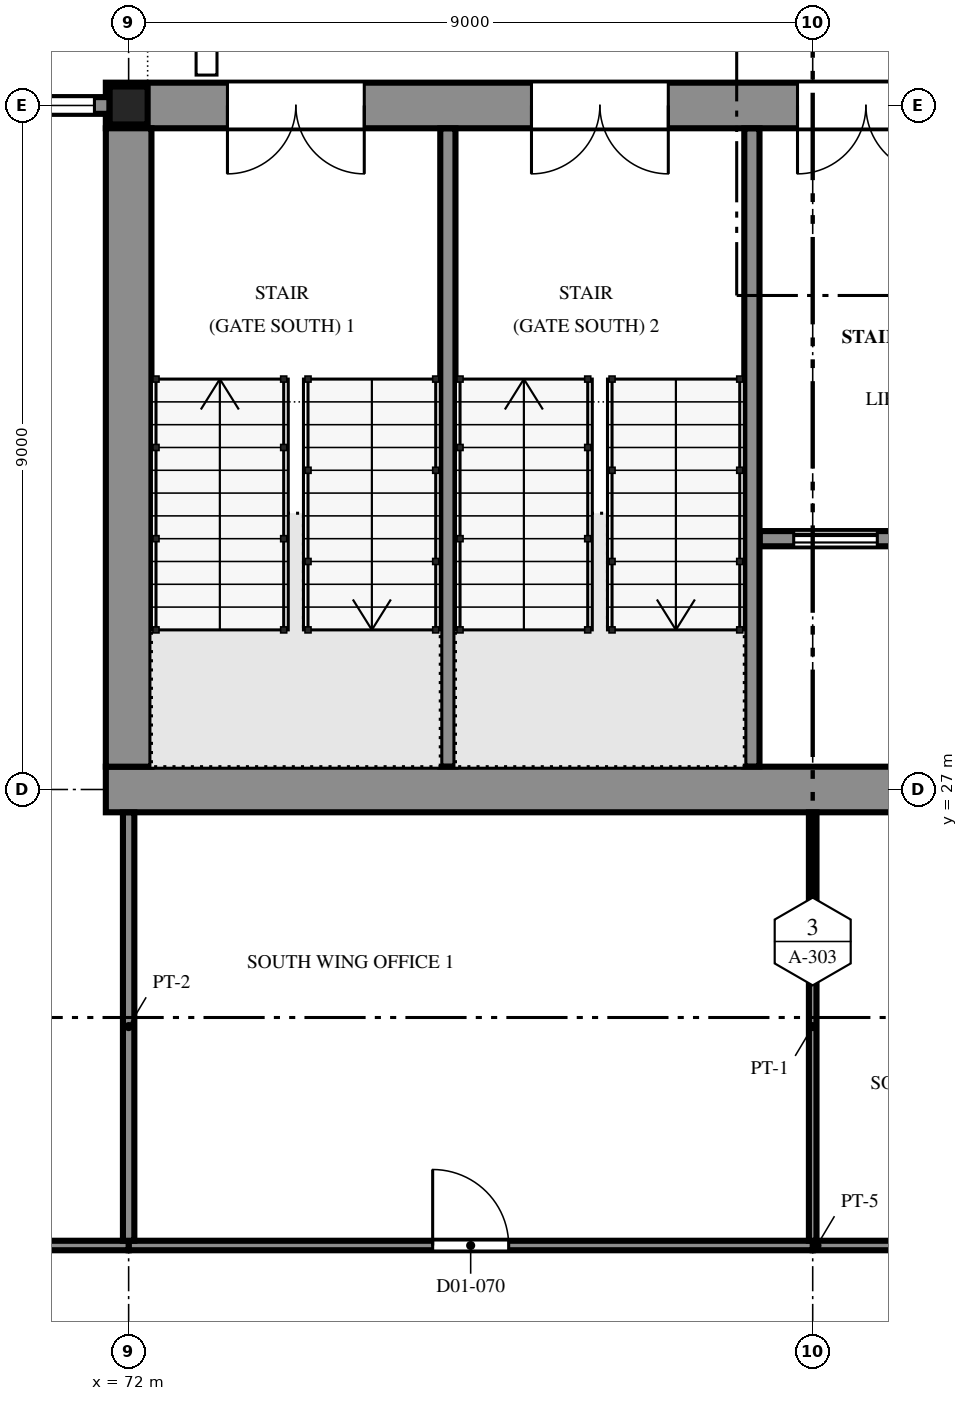
"""IFC4 building model, lengths in metres.
Left out: names, types, materials, properties, quantities, classifications, styles, units other than length and angle.
Written with IfcOpenShell. Run it as: python <this file> out.ifc"""

import sys

from ifc_helpers import new_model, si_unit, direction, frame, frame_2d, origin, origin_2d, place, context, subcontext, project, spatial, polyline, rectangle, hollow_rectangle, outline, extrude, element, fill, save


model = new_model("IFC4")
c1 = context("Model", 3, precision=1e-05, world=origin(), true_north=direction((0.0, 1.0)))
c2 = subcontext(c1, "Body", "Model", "MODEL_VIEW")
j1 = project(units=[si_unit("LENGTHUNIT", "METRE"), si_unit("PLANEANGLEUNIT", "RADIAN")], contexts=[c1])
p1 = place(None, origin())
s1 = spatial("IfcSite", under=j1, at=p1, CompositionType="ELEMENT")
p2 = place(p1, origin())
s2 = spatial("IfcBuilding", under=s1, at=p2, CompositionType="ELEMENT")
p3 = place(p2, frame((0.0, 0.0, 7.5)))
s3 = spatial("IfcBuildingStorey", under=s2, at=p3, CompositionType="ELEMENT", Elevation=7.5)
p4 = place(p3, frame((72.0, 36.0, 0.0), z_axis=(0.0, 0.0, 1.0), x_axis=(1.0, 0.0, 0.0)))
e1 = element("IfcColumn", 1, at=p4, inside=s3, PredefinedType="COLUMN", context=c2, shape_type="SweptSolid", body=[
    extrude(hollow_rectangle(XDim=0.5, YDim=0.5, WallThickness=0.032, at=origin_2d()), origin(), (0.0, 0.0, 1.0), 4.2),
])
p5 = place(p3, frame((71.7, 27.0, 0.0), z_axis=(0.0, 0.0, 1.0), x_axis=(1.0, 0.0, 0.0)))
e2 = element("IfcWall", 2, at=p5, inside=s3, PredefinedType="SOLIDWALL", context=c2, shape_type="SweptSolid", body=[
    extrude(rectangle(XDim=18.6, YDim=0.6, at=frame_2d((9.3, 0.0))), origin(), (0.0, 0.0, 1.0), 4.2),
])
p6 = place(p3, frame((71.7, 36.0, 0.0), z_axis=(0.0, 0.0, 1.0), x_axis=(1.0, 0.0, 0.0)))
e3 = element("IfcWall", 3, at=p6, inside=s3, PredefinedType="SOLIDWALL", context=c2, shape_type="SweptSolid", body=[
    extrude(rectangle(XDim=18.6, YDim=0.6, at=frame_2d((9.3, 0.0))), origin(), (0.0, 0.0, 1.0), 4.2),
])
p7 = place(p6, frame((1.6, 0.0, 0.0)))
e4 = element("IfcOpeningElement", 4, at=p7, cuts=e3, PredefinedType="OPENING", context=c2, shape_type="SweptSolid", body=[
    extrude(rectangle(XDim=1.8, YDim=2.1, at=frame_2d((0.9, 1.05))), frame((0.0, 0.31, 0.0), z_axis=(0.0, -1.0, 0.0), x_axis=(1.0, 0.0, 0.0)), (0.0, 0.0, 1.0), 0.62),
])
p8 = place(p6, frame((5.6, 0.0, 0.0)))
e5 = element("IfcOpeningElement", 5, at=p8, cuts=e3, PredefinedType="OPENING", context=c2, shape_type="SweptSolid", body=[
    extrude(rectangle(XDim=1.8, YDim=2.1, at=frame_2d((0.9, 1.05))), frame((0.0, 0.31, 0.0), z_axis=(0.0, -1.0, 0.0), x_axis=(1.0, 0.0, 0.0)), (0.0, 0.0, 1.0), 0.62),
])
p9 = place(p6, frame((9.1, 0.0, 0.0)))
e6 = element("IfcOpeningElement", 6, at=p9, cuts=e3, PredefinedType="OPENING", context=c2, shape_type="SweptSolid", body=[
    extrude(rectangle(XDim=1.8, YDim=2.1, at=frame_2d((0.9, 1.05))), frame((0.0, 0.31, 0.0), z_axis=(0.0, -1.0, 0.0), x_axis=(1.0, 0.0, 0.0)), (0.0, 0.0, 1.0), 0.62),
])
p10 = place(p3, frame((72.0, 27.3, 0.0), z_axis=(0.0, 0.0, 1.0), x_axis=(0.0, 1.0, 0.0)))
e7 = element("IfcWall", 7, at=p10, inside=s3, PredefinedType="SOLIDWALL", context=c2, shape_type="SweptSolid", body=[
    extrude(rectangle(XDim=8.4, YDim=0.6, at=frame_2d((4.2, 0.0))), origin(), (0.0, 0.0, 1.0), 4.2),
])
p11 = place(p3, frame((63.128, 36.0, 0.0), z_axis=(0.0, 0.0, 1.0), x_axis=(1.0, 0.0, 0.0)))
e8 = element("IfcWall", 8, at=p11, inside=s3, PredefinedType="SOLIDWALL", context=c2, shape_type="SweptSolid", body=[
    extrude(rectangle(XDim=8.622, YDim=0.22, at=frame_2d((4.311, 0.0))), origin(), (0.0, 0.0, 1.0), 3.597),
])
p12 = place(p11, frame((0.322, 0.0, 0.9)))
e9 = element("IfcOpeningElement", 9, at=p12, cuts=e8, PredefinedType="OPENING", context=c2, shape_type="SweptSolid", body=[
    extrude(rectangle(XDim=2.1, YDim=2.1, at=frame_2d((1.05, 1.05))), frame((0.0, 0.12, 0.0), z_axis=(0.0, -1.0, 0.0), x_axis=(1.0, 0.0, 0.0)), (0.0, 0.0, 1.0), 0.24),
])
p13 = place(p11, frame((3.322, 0.0, 0.9)))
e10 = element("IfcOpeningElement", 10, at=p13, cuts=e8, PredefinedType="OPENING", context=c2, shape_type="SweptSolid", body=[
    extrude(rectangle(XDim=2.1, YDim=2.1, at=frame_2d((1.05, 1.05))), frame((0.0, 0.12, 0.0), z_axis=(0.0, -1.0, 0.0), x_axis=(1.0, 0.0, 0.0)), (0.0, 0.0, 1.0), 0.24),
])
p14 = place(p11, frame((6.322, 0.0, 0.9)))
e11 = element("IfcOpeningElement", 11, at=p14, cuts=e8, PredefinedType="OPENING", context=c2, shape_type="SweptSolid", body=[
    extrude(rectangle(XDim=2.1, YDim=2.1, at=frame_2d((1.05, 1.05))), frame((0.0, 0.12, 0.0), z_axis=(0.0, -1.0, 0.0), x_axis=(1.0, 0.0, 0.0)), (0.0, 0.0, 1.0), 0.24),
])
for number, where, z_axis, x_axis in (
    (12, (76.2, 27.302, -0.13), (0.0, 0.0, 1.0), (0.0, 1.0, 0.0)),
    (13, (80.2, 27.302, -0.13), (0.0, 0.0, 1.0), (0.0, 1.0, 0.0)),
):
    element("IfcWall", number, at=place(p3, frame(where, z_axis=z_axis, x_axis=x_axis)), inside=s3, PredefinedType="SOLIDWALL", context=c2, shape_type="SweptSolid", body=[
        extrude(rectangle(XDim=8.396, YDim=0.2, at=frame_2d((4.198, 0.0))), origin(), (0.0, 0.0, 1.0), 3.646),
    ])
p15 = place(p3, frame((80.302, 30.3, 0.0), z_axis=(0.0, 0.0, 1.0), x_axis=(1.0, 0.0, 0.0)))
e14 = element("IfcWall", 14, at=p15, inside=s3, PredefinedType="SOLIDWALL", context=c2, shape_type="SweptSolid", body=[
    extrude(rectangle(XDim=2.198, YDim=0.2, at=frame_2d((1.099, 0.0))), origin(), (0.0, 0.0, 1.0), 3.516),
])
p16 = place(p15, frame((0.448, 0.0, 0.0)))
e15 = element("IfcOpeningElement", 15, at=p16, cuts=e14, PredefinedType="OPENING", context=c2, shape_type="SweptSolid", body=[
    extrude(rectangle(XDim=1.1, YDim=2.1, at=frame_2d((0.55, 1.05))), frame((0.0, 0.11, 0.0), z_axis=(0.0, -1.0, 0.0), x_axis=(1.0, 0.0, 0.0)), (0.0, 0.0, 1.0), 0.22),
])
p17 = place(p3, frame((81.0, 21.0, 0.0), z_axis=(0.0, 0.0, 1.0), x_axis=(1.0, 0.0, 0.0)))
e16 = element("IfcWall", 16, at=p17, inside=s3, PredefinedType="PARTITIONING", context=c2, shape_type="SweptSolid", body=[
    extrude(rectangle(XDim=9.0, YDim=0.125, at=frame_2d((4.5, 0.0))), origin(), (0.0, 0.0, 1.0), 3.307),
])
p18 = place(p17, frame((4.0, 0.0, 0.0)))
e17 = element("IfcOpeningElement", 17, at=p18, cuts=e16, PredefinedType="OPENING", context=c2, shape_type="SweptSolid", body=[
    extrude(rectangle(XDim=1.0, YDim=2.1, at=frame_2d((0.5, 1.05))), frame((0.0, 0.073, 0.0), z_axis=(0.0, -1.0, 0.0), x_axis=(1.0, 0.0, 0.0)), (0.0, 0.0, 1.0), 0.145),
])
p19 = place(p3, frame((72.0, 21.0, 0.0), z_axis=(0.0, 0.0, 1.0), x_axis=(1.0, 0.0, 0.0)))
e18 = element("IfcWall", 18, at=p19, inside=s3, PredefinedType="PARTITIONING", context=c2, shape_type="SweptSolid", body=[
    extrude(rectangle(XDim=9.0, YDim=0.125, at=frame_2d((4.5, 0.0))), origin(), (0.0, 0.0, 1.0), 3.307),
])
p20 = place(p19, frame((4.0, 0.0, 0.0)))
e19 = element("IfcOpeningElement", 19, at=p20, cuts=e18, PredefinedType="OPENING", context=c2, shape_type="SweptSolid", body=[
    extrude(rectangle(XDim=1.0, YDim=2.1, at=frame_2d((0.5, 1.05))), frame((0.0, 0.073, 0.0), z_axis=(0.0, -1.0, 0.0), x_axis=(1.0, 0.0, 0.0)), (0.0, 0.0, 1.0), 0.145),
])
p21 = place(p3, frame((63.112, 21.0, 0.0), z_axis=(0.0, 0.0, 1.0), x_axis=(1.0, 0.0, 0.0)))
e20 = element("IfcWall", 20, at=p21, inside=s3, PredefinedType="PARTITIONING", context=c2, shape_type="SweptSolid", body=[
    extrude(rectangle(XDim=8.888, YDim=0.125, at=frame_2d((4.444, 0.0))), origin(), (0.0, 0.0, 1.0), 3.307),
])
p22 = place(p21, frame((3.888, 0.0, 0.0)))
e21 = element("IfcOpeningElement", 21, at=p22, cuts=e20, PredefinedType="OPENING", context=c2, shape_type="SweptSolid", body=[
    extrude(rectangle(XDim=1.0, YDim=2.1, at=frame_2d((0.5, 1.05))), frame((0.0, 0.073, 0.0), z_axis=(0.0, -1.0, 0.0), x_axis=(1.0, 0.0, 0.0)), (0.0, 0.0, 1.0), 0.145),
])
p23 = place(p3, frame((72.0, 26.698, 0.0), z_axis=(0.0, 0.0, 1.0), x_axis=(0.0, -1.0, 0.0)))
e22 = element("IfcWall", 22, at=p23, inside=s3, PredefinedType="PARTITIONING", context=c2, shape_type="SweptSolid", body=[
    extrude(rectangle(XDim=5.635, YDim=0.15, at=frame_2d((2.818, 0.0))), origin(), (0.0, 0.0, 1.0), 3.307),
])
p24 = place(p3, frame((81.0, 26.698, 0.0), z_axis=(0.0, 0.0, 1.0), x_axis=(0.0, -1.0, 0.0)))
e23 = element("IfcWall", 23, at=p24, inside=s3, PredefinedType="PARTITIONING", context=c2, shape_type="SweptSolid", body=[
    extrude(rectangle(XDim=5.635, YDim=0.1, at=frame_2d((2.818, 0.0))), origin(), (0.0, 0.0, 1.0), 3.643),
])
p25 = place(p14, origin())
e24 = element("IfcWindow", 24, at=p25, inside=s3, PartitioningType="DOUBLE_PANEL_VERTICAL", PredefinedType="WINDOW", context=c2, shape_type="SweptSolid", body=[
    extrude(outline(polyline([(0.0, 0.0), (2.1, 0.0), (2.1, 2.1), (0.0, 2.1), (0.0, 0.0)]), holes=[polyline([(0.07, 0.07), (2.03, 0.07), (2.03, 2.03), (0.07, 2.03), (0.07, 0.07)])]), frame((0.0, 0.03, 0.0), z_axis=(0.0, -1.0, 0.0), x_axis=(1.0, 0.0, 0.0)), (0.0, 0.0, 1.0), 0.06),
    extrude(rectangle(XDim=0.04, YDim=1.96, at=frame_2d((1.05, 1.05))), frame((0.0, 0.022, 0.0), z_axis=(0.0, -1.0, 0.0), x_axis=(1.0, 0.0, 0.0)), (0.0, 0.0, 1.0), 0.044),
    extrude(outline(polyline([(0.07, 0.07), (1.03, 0.07), (1.03, 2.03), (0.07, 2.03), (0.07, 0.07)]), holes=[polyline([(0.1, 0.1), (1.0, 0.1), (1.0, 2.0), (0.1, 2.0), (0.1, 0.1)])]), frame((0.0, 0.022, 0.0), z_axis=(0.0, -1.0, 0.0), x_axis=(1.0, 0.0, 0.0)), (0.0, 0.0, 1.0), 0.045),
    extrude(rectangle(XDim=0.9, YDim=1.9, at=frame_2d((0.55, 1.05))), frame((0.0, 0.006, 0.0), z_axis=(0.0, -1.0, 0.0), x_axis=(1.0, 0.0, 0.0)), (0.0, 0.0, 1.0), 0.012),
    extrude(outline(polyline([(1.07, 0.07), (2.03, 0.07), (2.03, 2.03), (1.07, 2.03), (1.07, 0.07)]), holes=[polyline([(1.1, 0.1), (2.0, 0.1), (2.0, 2.0), (1.1, 2.0), (1.1, 0.1)])]), frame((0.0, 0.022, 0.0), z_axis=(0.0, -1.0, 0.0), x_axis=(1.0, 0.0, 0.0)), (0.0, 0.0, 1.0), 0.045),
    extrude(rectangle(XDim=0.9, YDim=1.9, at=frame_2d((1.55, 1.05))), frame((0.0, 0.006, 0.0), z_axis=(0.0, -1.0, 0.0), x_axis=(1.0, 0.0, 0.0)), (0.0, 0.0, 1.0), 0.012),
])
fill(e11, e24)
p26 = place(p16, origin())
e25 = element("IfcDoor", 25, at=p26, inside=s3, OperationType="SLIDING_TO_LEFT", PredefinedType="DOOR", context=c2, shape_type="SweptSolid", body=[
    extrude(outline(polyline([(0.0, 0.0), (0.07, 0.0), (0.07, 2.03), (1.03, 2.03), (1.03, 0.0), (1.1, 0.0), (1.1, 2.1), (0.0, 2.1), (0.0, 0.0)])), frame((0.0, 0.025, 0.0), z_axis=(0.0, -1.0, 0.0), x_axis=(1.0, 0.0, 0.0)), (0.0, 0.0, 1.0), 0.05),
    extrude(rectangle(XDim=0.524, YDim=2.016, at=frame_2d((0.336, 1.018))), frame((0.0, 0.018, 0.0), z_axis=(0.0, -1.0, 0.0), x_axis=(1.0, 0.0, 0.0)), (0.0, 0.0, 1.0), 0.016),
    extrude(rectangle(XDim=0.52, YDim=2.016, at=frame_2d((0.766, 1.018))), frame((0.0, -0.002, 0.0), z_axis=(0.0, -1.0, 0.0), x_axis=(1.0, 0.0, 0.0)), (0.0, 0.0, 1.0), 0.016),
])
fill(e15, e25)
p27 = place(p20, origin())
e26 = element("IfcDoor", 26, at=p27, inside=s3, OperationType="SINGLE_SWING_LEFT", PredefinedType="DOOR", context=c2, shape_type="SweptSolid", body=[
    extrude(outline(polyline([(0.0, 0.0), (0.07, 0.0), (0.07, 2.03), (0.93, 2.03), (0.93, 0.0), (1.0, 0.0), (1.0, 2.1), (0.0, 2.1), (0.0, 0.0)])), frame((0.0, 0.025, 0.0), z_axis=(0.0, -1.0, 0.0), x_axis=(1.0, 0.0, 0.0)), (0.0, 0.0, 1.0), 0.05),
    extrude(outline(polyline([(0.074, 0.01), (0.926, 0.01), (0.926, 2.026), (0.074, 2.026), (0.074, 0.01)]), holes=[polyline([(0.194, 0.16), (0.806, 0.16), (0.806, 1.01), (0.194, 1.01), (0.194, 0.16)]), polyline([(0.35, 1.16), (0.65, 1.16), (0.65, 1.76), (0.35, 1.76), (0.35, 1.16)])]), frame((0.0, 0.017, 0.0), z_axis=(0.0, -1.0, 0.0), x_axis=(1.0, 0.0, 0.0)), (0.0, 0.0, 1.0), 0.035),
    extrude(rectangle(XDim=0.612, YDim=0.85, at=frame_2d((0.5, 0.585))), frame((0.0, 0.009, 0.0), z_axis=(0.0, -1.0, 0.0), x_axis=(1.0, 0.0, 0.0)), (0.0, 0.0, 1.0), 0.017),
    extrude(rectangle(XDim=0.3, YDim=0.6, at=frame_2d((0.5, 1.46))), frame((0.0, 0.006, 0.0), z_axis=(0.0, -1.0, 0.0), x_axis=(1.0, 0.0, 0.0)), (0.0, 0.0, 1.0), 0.012),
])
fill(e19, e26)
p28 = place(p7, frame((1.8, 0.0, 0.0), z_axis=(0.0, 0.0, 1.0), x_axis=(-1.0, 0.0, 0.0)))
e27 = element("IfcDoor", 27, at=p28, inside=s3, OperationType="DOUBLE_DOOR_SINGLE_SWING", PredefinedType="DOOR", context=c2, shape_type="SweptSolid", body=[
    extrude(outline(polyline([(0.0, 0.0), (0.07, 0.0), (0.07, 2.03), (1.73, 2.03), (1.73, 0.0), (1.8, 0.0), (1.8, 2.1), (0.0, 2.1), (0.0, 0.0)])), frame((0.0, 0.025, 0.0), z_axis=(0.0, -1.0, 0.0), x_axis=(1.0, 0.0, 0.0)), (0.0, 0.0, 1.0), 0.05),
    extrude(outline(polyline([(0.074, 0.01), (0.897, 0.01), (0.897, 2.026), (0.074, 2.026), (0.074, 0.01)]), holes=[polyline([(0.194, 0.16), (0.777, 0.16), (0.777, 1.01), (0.194, 1.01), (0.194, 0.16)]), polyline([(0.335, 1.16), (0.635, 1.16), (0.635, 1.76), (0.335, 1.76), (0.335, 1.16)])]), frame((0.0, 0.017, 0.0), z_axis=(0.0, -1.0, 0.0), x_axis=(1.0, 0.0, 0.0)), (0.0, 0.0, 1.0), 0.035),
    extrude(rectangle(XDim=0.583, YDim=0.85, at=frame_2d((0.485, 0.585))), frame((0.0, 0.009, 0.0), z_axis=(0.0, -1.0, 0.0), x_axis=(1.0, 0.0, 0.0)), (0.0, 0.0, 1.0), 0.017),
    extrude(rectangle(XDim=0.3, YDim=0.6, at=frame_2d((0.485, 1.46))), frame((0.0, 0.006, 0.0), z_axis=(0.0, -1.0, 0.0), x_axis=(1.0, 0.0, 0.0)), (0.0, 0.0, 1.0), 0.012),
    extrude(outline(polyline([(0.903, 0.01), (1.726, 0.01), (1.726, 2.026), (0.903, 2.026), (0.903, 0.01)]), holes=[polyline([(1.023, 0.16), (1.606, 0.16), (1.606, 1.01), (1.023, 1.01), (1.023, 0.16)]), polyline([(1.165, 1.16), (1.465, 1.16), (1.465, 1.76), (1.165, 1.76), (1.165, 1.16)])]), frame((0.0, 0.017, 0.0), z_axis=(0.0, -1.0, 0.0), x_axis=(1.0, 0.0, 0.0)), (0.0, 0.0, 1.0), 0.035),
    extrude(rectangle(XDim=0.583, YDim=0.85, at=frame_2d((1.314, 0.585))), frame((0.0, 0.009, 0.0), z_axis=(0.0, -1.0, 0.0), x_axis=(1.0, 0.0, 0.0)), (0.0, 0.0, 1.0), 0.017),
    extrude(rectangle(XDim=0.3, YDim=0.6, at=frame_2d((1.314, 1.46))), frame((0.0, 0.006, 0.0), z_axis=(0.0, -1.0, 0.0), x_axis=(1.0, 0.0, 0.0)), (0.0, 0.0, 1.0), 0.012),
])
fill(e4, e27)
p29 = place(p8, frame((1.8, 0.0, 0.0), z_axis=(0.0, 0.0, 1.0), x_axis=(-1.0, 0.0, 0.0)))
e28 = element("IfcDoor", 28, at=p29, inside=s3, OperationType="DOUBLE_DOOR_SINGLE_SWING", PredefinedType="DOOR", context=c2, shape_type="SweptSolid", body=[
    extrude(outline(polyline([(0.0, 0.0), (0.07, 0.0), (0.07, 2.03), (1.73, 2.03), (1.73, 0.0), (1.8, 0.0), (1.8, 2.1), (0.0, 2.1), (0.0, 0.0)])), frame((0.0, 0.025, 0.0), z_axis=(0.0, -1.0, 0.0), x_axis=(1.0, 0.0, 0.0)), (0.0, 0.0, 1.0), 0.05),
    extrude(outline(polyline([(0.074, 0.01), (0.897, 0.01), (0.897, 2.026), (0.074, 2.026), (0.074, 0.01)]), holes=[polyline([(0.194, 0.16), (0.777, 0.16), (0.777, 1.01), (0.194, 1.01), (0.194, 0.16)]), polyline([(0.335, 1.16), (0.635, 1.16), (0.635, 1.76), (0.335, 1.76), (0.335, 1.16)])]), frame((0.0, 0.017, 0.0), z_axis=(0.0, -1.0, 0.0), x_axis=(1.0, 0.0, 0.0)), (0.0, 0.0, 1.0), 0.035),
    extrude(rectangle(XDim=0.583, YDim=0.85, at=frame_2d((0.485, 0.585))), frame((0.0, 0.009, 0.0), z_axis=(0.0, -1.0, 0.0), x_axis=(1.0, 0.0, 0.0)), (0.0, 0.0, 1.0), 0.017),
    extrude(rectangle(XDim=0.3, YDim=0.6, at=frame_2d((0.485, 1.46))), frame((0.0, 0.006, 0.0), z_axis=(0.0, -1.0, 0.0), x_axis=(1.0, 0.0, 0.0)), (0.0, 0.0, 1.0), 0.012),
    extrude(outline(polyline([(0.903, 0.01), (1.726, 0.01), (1.726, 2.026), (0.903, 2.026), (0.903, 0.01)]), holes=[polyline([(1.023, 0.16), (1.606, 0.16), (1.606, 1.01), (1.023, 1.01), (1.023, 0.16)]), polyline([(1.165, 1.16), (1.465, 1.16), (1.465, 1.76), (1.165, 1.76), (1.165, 1.16)])]), frame((0.0, 0.017, 0.0), z_axis=(0.0, -1.0, 0.0), x_axis=(1.0, 0.0, 0.0)), (0.0, 0.0, 1.0), 0.035),
    extrude(rectangle(XDim=0.583, YDim=0.85, at=frame_2d((1.314, 0.585))), frame((0.0, 0.009, 0.0), z_axis=(0.0, -1.0, 0.0), x_axis=(1.0, 0.0, 0.0)), (0.0, 0.0, 1.0), 0.017),
    extrude(rectangle(XDim=0.3, YDim=0.6, at=frame_2d((1.314, 1.46))), frame((0.0, 0.006, 0.0), z_axis=(0.0, -1.0, 0.0), x_axis=(1.0, 0.0, 0.0)), (0.0, 0.0, 1.0), 0.012),
])
fill(e5, e28)
p30 = place(p9, frame((1.8, 0.0, 0.0), z_axis=(0.0, 0.0, 1.0), x_axis=(-1.0, 0.0, 0.0)))
e29 = element("IfcDoor", 29, at=p30, inside=s3, OperationType="DOUBLE_DOOR_SINGLE_SWING", PredefinedType="DOOR", context=c2, shape_type="SweptSolid", body=[
    extrude(outline(polyline([(0.0, 0.0), (0.07, 0.0), (0.07, 2.03), (1.73, 2.03), (1.73, 0.0), (1.8, 0.0), (1.8, 2.1), (0.0, 2.1), (0.0, 0.0)])), frame((0.0, 0.025, 0.0), z_axis=(0.0, -1.0, 0.0), x_axis=(1.0, 0.0, 0.0)), (0.0, 0.0, 1.0), 0.05),
    extrude(outline(polyline([(0.074, 0.01), (0.897, 0.01), (0.897, 2.026), (0.074, 2.026), (0.074, 0.01)]), holes=[polyline([(0.194, 0.16), (0.777, 0.16), (0.777, 1.01), (0.194, 1.01), (0.194, 0.16)]), polyline([(0.335, 1.16), (0.635, 1.16), (0.635, 1.76), (0.335, 1.76), (0.335, 1.16)])]), frame((0.0, 0.017, 0.0), z_axis=(0.0, -1.0, 0.0), x_axis=(1.0, 0.0, 0.0)), (0.0, 0.0, 1.0), 0.035),
    extrude(rectangle(XDim=0.583, YDim=0.85, at=frame_2d((0.485, 0.585))), frame((0.0, 0.009, 0.0), z_axis=(0.0, -1.0, 0.0), x_axis=(1.0, 0.0, 0.0)), (0.0, 0.0, 1.0), 0.017),
    extrude(rectangle(XDim=0.3, YDim=0.6, at=frame_2d((0.485, 1.46))), frame((0.0, 0.006, 0.0), z_axis=(0.0, -1.0, 0.0), x_axis=(1.0, 0.0, 0.0)), (0.0, 0.0, 1.0), 0.012),
    extrude(outline(polyline([(0.903, 0.01), (1.726, 0.01), (1.726, 2.026), (0.903, 2.026), (0.903, 0.01)]), holes=[polyline([(1.023, 0.16), (1.606, 0.16), (1.606, 1.01), (1.023, 1.01), (1.023, 0.16)]), polyline([(1.165, 1.16), (1.465, 1.16), (1.465, 1.76), (1.165, 1.76), (1.165, 1.16)])]), frame((0.0, 0.017, 0.0), z_axis=(0.0, -1.0, 0.0), x_axis=(1.0, 0.0, 0.0)), (0.0, 0.0, 1.0), 0.035),
    extrude(rectangle(XDim=0.583, YDim=0.85, at=frame_2d((1.314, 0.585))), frame((0.0, 0.009, 0.0), z_axis=(0.0, -1.0, 0.0), x_axis=(1.0, 0.0, 0.0)), (0.0, 0.0, 1.0), 0.017),
    extrude(rectangle(XDim=0.3, YDim=0.6, at=frame_2d((1.314, 1.46))), frame((0.0, 0.006, 0.0), z_axis=(0.0, -1.0, 0.0), x_axis=(1.0, 0.0, 0.0)), (0.0, 0.0, 1.0), 0.012),
])
fill(e6, e29)
save(model, sys.argv[1])
